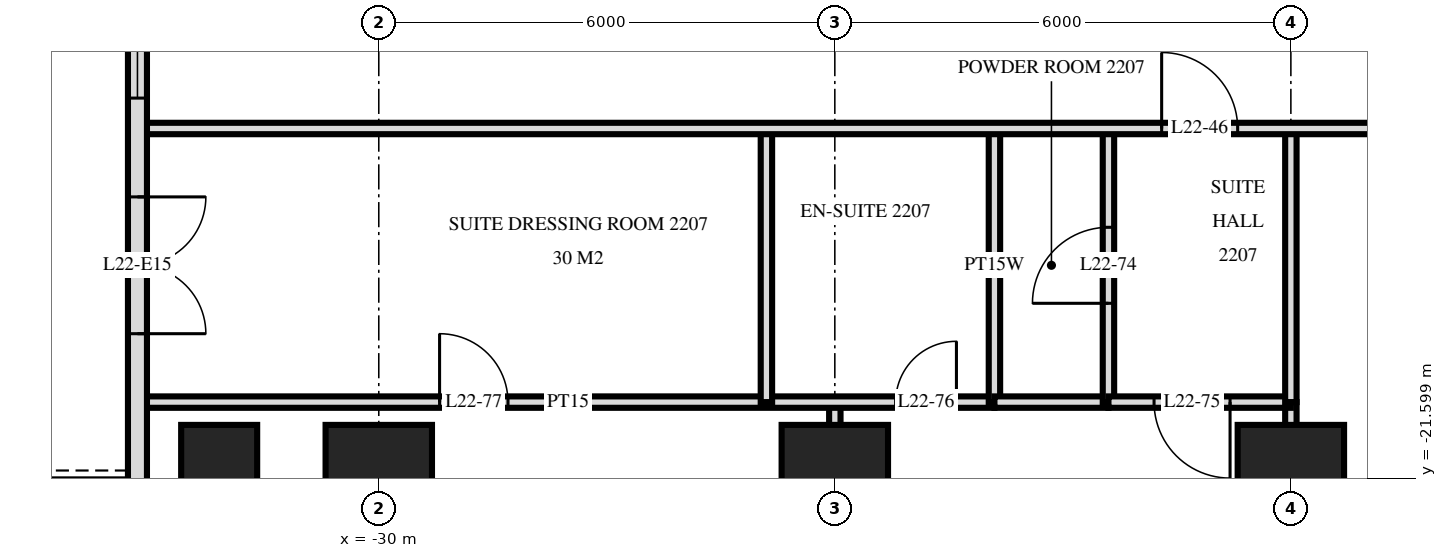
"""IFC4 building model, lengths in metres.
Left out: names, types, materials, properties, quantities, classifications, styles, units other than length and angle.
Written with IfcOpenShell. Run it as: python <this file> out.ifc"""

import sys

from ifc_helpers import new_model, si_unit, direction, frame, frame_2d, origin, origin_2d, place, context, subcontext, project, spatial, rectangle, extrude, element, fill, save


model = new_model("IFC4")
c1 = context("Model", 3, precision=1e-05, world=origin(), true_north=direction((0.0, 1.0)))
c2 = subcontext(c1, "Body", "Model", "MODEL_VIEW")
j1 = project(units=[si_unit("LENGTHUNIT", "METRE"), si_unit("PLANEANGLEUNIT", "RADIAN")], contexts=[c1])
p1 = place(None, origin())
s1 = spatial("IfcSite", under=j1, at=p1, CompositionType="ELEMENT")
p2 = place(p1, origin())
s2 = spatial("IfcBuilding", under=s1, at=p2, CompositionType="ELEMENT")
p3 = place(p2, frame((0.0, 0.0, 88.8)))
s3 = spatial("IfcBuildingStorey", under=s2, at=p3, CompositionType="ELEMENT", Elevation=88.8)
p4 = place(p3, frame((-32.1, -21.6, 0.0), z_axis=(0.0, 0.0, 1.0), x_axis=(0.0, 1.0, 0.0)))
e1 = element("IfcColumn", 1, at=p4, inside=s3, PredefinedType="COLUMN", context=c2, shape_type="SweptSolid", body=[
    extrude(rectangle(XDim=1.4, YDim=1.0, at=origin_2d()), origin(), (0.0, 0.0, 1.0), 3.6),
])
for number, where, z_axis, x_axis in (
    (2, (-30.0, -21.6, 0.0), (0.0, 0.0, 1.0), (1.0, 0.0, 0.0)),
    (3, (-24.0, -21.6, 0.0), (0.0, 0.0, 1.0), (1.0, 0.0, 0.0)),
    (4, (-18.0, -21.6, 0.0), (0.0, 0.0, 1.0), (1.0, 0.0, 0.0)),
):
    element("IfcColumn", number, at=place(p3, frame(where, z_axis=z_axis, x_axis=x_axis)), inside=s3, PredefinedType="COLUMN", context=c2, shape_type="SweptSolid", body=[
        extrude(rectangle(XDim=1.4, YDim=1.4, at=origin_2d()), origin(), (0.0, 0.0, 1.0), 3.6),
    ])
p5 = place(p3, frame((-33.175, -3.325, 0.0), z_axis=(0.0, 0.0, 1.0), x_axis=(0.0, -1.0, 0.0)))
e5 = element("IfcWall", 5, at=p5, inside=s3, PredefinedType="SOLIDWALL", context=c2, shape_type="SweptSolid", body=[
    extrude(rectangle(XDim=21.551, YDim=0.25, at=frame_2d((10.775, 0.0))), origin(), (0.0, 0.0, 1.0), 3.32),
])
p6 = place(p5, frame((7.025, 0.0, 0.0)))
e6 = element("IfcOpeningElement", 6, at=p6, cuts=e5, PredefinedType="OPENING", context=c2, shape_type="SweptSolid", body=[
    extrude(rectangle(XDim=1.8, YDim=2.4, at=frame_2d((0.9, 1.2))), frame((0.0, 0.135, 0.0), z_axis=(0.0, -1.0, 0.0), x_axis=(1.0, 0.0, 0.0)), (0.0, 0.0, 1.0), 0.27),
])
p7 = place(p5, frame((12.075, 0.0, 0.3)))
e7 = element("IfcOpeningElement", 7, at=p7, cuts=e5, PredefinedType="OPENING", context=c2, shape_type="SweptSolid", body=[
    extrude(rectangle(XDim=1.2, YDim=2.1, at=frame_2d((0.6, 1.05))), frame((0.0, 0.135, 0.0), z_axis=(0.0, -1.0, 0.0), x_axis=(1.0, 0.0, 0.0)), (0.0, 0.0, 1.0), 0.27),
])
p8 = place(p5, frame((14.575, 0.0, 0.0)))
e8 = element("IfcOpeningElement", 8, at=p8, cuts=e5, PredefinedType="OPENING", context=c2, shape_type="SweptSolid", body=[
    extrude(rectangle(XDim=1.8, YDim=2.4, at=frame_2d((0.9, 1.2))), frame((0.0, 0.135, 0.0), z_axis=(0.0, -1.0, 0.0), x_axis=(1.0, 0.0, 0.0)), (0.0, 0.0, 1.0), 0.27),
])
p9 = place(p5, frame((18.875, 0.0, 0.0)))
e9 = element("IfcOpeningElement", 9, at=p9, cuts=e5, PredefinedType="OPENING", context=c2, shape_type="SweptSolid", body=[
    extrude(rectangle(XDim=1.8, YDim=2.4, at=frame_2d((0.9, 1.2))), frame((0.0, 0.135, 0.0), z_axis=(0.0, -1.0, 0.0), x_axis=(1.0, 0.0, 0.0)), (0.0, 0.0, 1.0), 0.27),
])
p10 = place(p3, frame((-18.0, -20.6, 0.0), z_axis=(0.0, 0.0, 1.0), x_axis=(0.0, 1.0, 0.0)))
e10 = element("IfcWall", 10, at=p10, inside=s3, PredefinedType="PARTITIONING", context=c2, shape_type="SweptSolid", body=[
    extrude(rectangle(XDim=3.6, YDim=0.15, at=frame_2d((1.8, 0.0))), origin(), (0.0, 0.0, 1.0), 3.32),
])
p11 = place(p3, frame((-18.0, -29.22, 0.0), z_axis=(0.0, 0.0, 1.0), x_axis=(0.0, 1.0, 0.0)))
e11 = element("IfcWall", 11, at=p11, inside=s3, PredefinedType="PARTITIONING", context=c2, shape_type="SweptSolid", body=[
    extrude(rectangle(XDim=8.62, YDim=0.15, at=frame_2d((4.31, 0.0))), origin(), (0.0, 0.0, 1.0), 3.32),
])
p12 = place(p3, frame((-20.4, -20.6, 0.0), z_axis=(0.0, 0.0, 1.0), x_axis=(0.0, 1.0, 0.0)))
e12 = element("IfcWall", 12, at=p12, inside=s3, PredefinedType="PARTITIONING", context=c2, shape_type="SweptSolid", body=[
    extrude(rectangle(XDim=3.6, YDim=0.15, at=frame_2d((1.8, 0.0))), origin(), (0.0, 0.0, 1.0), 3.32),
])
p13 = place(p12, frame((1.3, 0.0, 0.0)))
e13 = element("IfcOpeningElement", 13, at=p13, cuts=e12, PredefinedType="OPENING", context=c2, shape_type="SweptSolid", body=[
    extrude(rectangle(XDim=1.0, YDim=2.1, at=frame_2d((0.5, 1.05))), frame((0.0, 0.085, 0.0), z_axis=(0.0, -1.0, 0.0), x_axis=(1.0, 0.0, 0.0)), (0.0, 0.0, 1.0), 0.17),
])
p14 = place(p3, frame((-21.9, -20.6, 0.0), z_axis=(0.0, 0.0, 1.0), x_axis=(0.0, 1.0, 0.0)))
e14 = element("IfcWall", 14, at=p14, inside=s3, PredefinedType="PLUMBINGWALL", context=c2, shape_type="SweptSolid", body=[
    extrude(rectangle(XDim=3.6, YDim=0.15, at=frame_2d((1.8, 0.0))), origin(), (0.0, 0.0, 1.0), 3.32),
])
p15 = place(p3, frame((-24.0, -29.22, 0.0), z_axis=(0.0, 0.0, 1.0), x_axis=(0.0, 1.0, 0.0)))
e15 = element("IfcWall", 15, at=p15, inside=s3, PredefinedType="PARTITIONING", context=c2, shape_type="SweptSolid", body=[
    extrude(rectangle(XDim=8.62, YDim=0.15, at=frame_2d((4.31, 0.0))), origin(), (0.0, 0.0, 1.0), 3.32),
])
p16 = place(p15, frame((3.79, 0.0, 0.0)))
e16 = element("IfcOpeningElement", 16, at=p16, cuts=e15, PredefinedType="OPENING", context=c2, shape_type="SweptSolid", body=[
    extrude(rectangle(XDim=0.9, YDim=2.1, at=frame_2d((0.45, 1.05))), frame((0.0, 0.085, 0.0), z_axis=(0.0, -1.0, 0.0), x_axis=(1.0, 0.0, 0.0)), (0.0, 0.0, 1.0), 0.17),
])
p17 = place(p3, frame((-24.9, -20.6, 0.0), z_axis=(0.0, 0.0, 1.0), x_axis=(0.0, 1.0, 0.0)))
e17 = element("IfcWall", 17, at=p17, inside=s3, PredefinedType="PARTITIONING", context=c2, shape_type="SweptSolid", body=[
    extrude(rectangle(XDim=3.6, YDim=0.15, at=frame_2d((1.8, 0.0))), origin(), (0.0, 0.0, 1.0), 3.32),
])
p18 = place(p3, frame((-20.4, -20.6, 0.0), z_axis=(0.0, 0.0, 1.0), x_axis=(1.0, 0.0, 0.0)))
e18 = element("IfcWall", 18, at=p18, inside=s3, PredefinedType="PARTITIONING", context=c2, shape_type="SweptSolid", body=[
    extrude(rectangle(XDim=2.4, YDim=0.15, at=frame_2d((1.2, 0.0))), origin(), (0.0, 0.0, 1.0), 3.32),
])
p19 = place(p18, frame((0.6, 0.0, 0.0)))
e19 = element("IfcOpeningElement", 19, at=p19, cuts=e18, PredefinedType="OPENING", context=c2, shape_type="SweptSolid", body=[
    extrude(rectangle(XDim=1.0, YDim=2.1, at=frame_2d((0.5, 1.05))), frame((0.0, 0.085, 0.0), z_axis=(0.0, -1.0, 0.0), x_axis=(1.0, 0.0, 0.0)), (0.0, 0.0, 1.0), 0.17),
])
p20 = place(p3, frame((-33.12, -20.6, 0.0), z_axis=(0.0, 0.0, 1.0), x_axis=(1.0, 0.0, 0.0)))
e20 = element("IfcWall", 20, at=p20, inside=s3, PredefinedType="PARTITIONING", context=c2, shape_type="SweptSolid", body=[
    extrude(rectangle(XDim=11.22, YDim=0.15, at=frame_2d((5.61, 0.0))), origin(), (0.0, 0.0, 1.0), 3.32),
])
p21 = place(p20, frame((9.92, 0.0, 0.0)))
e21 = element("IfcOpeningElement", 21, at=p21, cuts=e20, PredefinedType="OPENING", context=c2, shape_type="SweptSolid", body=[
    extrude(rectangle(XDim=0.8, YDim=2.1, at=frame_2d((0.4, 1.05))), frame((0.0, 0.085, 0.0), z_axis=(0.0, -1.0, 0.0), x_axis=(1.0, 0.0, 0.0)), (0.0, 0.0, 1.0), 0.17),
])
p22 = place(p20, frame((3.92, 0.0, 0.0)))
e22 = element("IfcOpeningElement", 22, at=p22, cuts=e20, PredefinedType="OPENING", context=c2, shape_type="SweptSolid", body=[
    extrude(rectangle(XDim=0.9, YDim=2.1, at=frame_2d((0.45, 1.05))), frame((0.0, 0.085, 0.0), z_axis=(0.0, -1.0, 0.0), x_axis=(1.0, 0.0, 0.0)), (0.0, 0.0, 1.0), 0.17),
])
p23 = place(p3, frame((-21.9, -20.6, 0.0), z_axis=(0.0, 0.0, 1.0), x_axis=(1.0, 0.0, 0.0)))
e23 = element("IfcWall", 23, at=p23, inside=s3, PredefinedType="PLUMBINGWALL", context=c2, shape_type="SweptSolid", body=[
    extrude(rectangle(XDim=1.5, YDim=0.15, at=frame_2d((0.75, 0.0))), origin(), (0.0, 0.0, 1.0), 3.32),
])
p24 = place(p3, frame((-33.12, -17.0, 0.0), z_axis=(0.0, 0.0, 1.0), x_axis=(1.0, 0.0, 0.0)))
e24 = element("IfcWall", 24, at=p24, inside=s3, PredefinedType="PARTITIONING", context=c2, shape_type="SweptSolid", body=[
    extrude(rectangle(XDim=66.24, YDim=0.15, at=frame_2d((33.12, 0.0))), origin(), (0.0, 0.0, 1.0), 3.32),
])
p25 = place(p24, frame((16.27, 0.0, 0.0)))
e25 = element("IfcOpeningElement", 25, at=p25, cuts=e24, PredefinedType="OPENING", context=c2, shape_type="SweptSolid", body=[
    extrude(rectangle(XDim=1.0, YDim=2.1, at=frame_2d((0.5, 1.05))), frame((0.0, 0.085, 0.0), z_axis=(0.0, -1.0, 0.0), x_axis=(1.0, 0.0, 0.0)), (0.0, 0.0, 1.0), 0.17),
])
p26 = place(p24, frame((22.97, 0.0, 0.0)))
e26 = element("IfcOpeningElement", 26, at=p26, cuts=e24, PredefinedType="OPENING", context=c2, shape_type="SweptSolid", body=[
    extrude(rectangle(XDim=1.0, YDim=2.1, at=frame_2d((0.5, 1.05))), frame((0.0, 0.085, 0.0), z_axis=(0.0, -1.0, 0.0), x_axis=(1.0, 0.0, 0.0)), (0.0, 0.0, 1.0), 0.17),
])
p27 = place(p24, frame((34.42, 0.0, 0.0)))
e27 = element("IfcOpeningElement", 27, at=p27, cuts=e24, PredefinedType="OPENING", context=c2, shape_type="SweptSolid", body=[
    extrude(rectangle(XDim=1.0, YDim=2.1, at=frame_2d((0.5, 1.05))), frame((0.0, 0.085, 0.0), z_axis=(0.0, -1.0, 0.0), x_axis=(1.0, 0.0, 0.0)), (0.0, 0.0, 1.0), 0.17),
])
p28 = place(p24, frame((39.22, 0.0, 0.0)))
e28 = element("IfcOpeningElement", 28, at=p28, cuts=e24, PredefinedType="OPENING", context=c2, shape_type="SweptSolid", body=[
    extrude(rectangle(XDim=1.0, YDim=2.1, at=frame_2d((0.5, 1.05))), frame((0.0, 0.085, 0.0), z_axis=(0.0, -1.0, 0.0), x_axis=(1.0, 0.0, 0.0)), (0.0, 0.0, 1.0), 0.17),
])
p29 = place(p24, frame((42.27, 0.0, 0.0)))
e29 = element("IfcOpeningElement", 29, at=p29, cuts=e24, PredefinedType="OPENING", context=c2, shape_type="SweptSolid", body=[
    extrude(rectangle(XDim=1.0, YDim=2.1, at=frame_2d((0.5, 1.05))), frame((0.0, 0.085, 0.0), z_axis=(0.0, -1.0, 0.0), x_axis=(1.0, 0.0, 0.0)), (0.0, 0.0, 1.0), 0.17),
])
p30 = place(p24, frame((45.82, 0.0, 0.0)))
e30 = element("IfcOpeningElement", 30, at=p30, cuts=e24, PredefinedType="OPENING", context=c2, shape_type="SweptSolid", body=[
    extrude(rectangle(XDim=1.0, YDim=2.1, at=frame_2d((0.5, 1.05))), frame((0.0, 0.085, 0.0), z_axis=(0.0, -1.0, 0.0), x_axis=(1.0, 0.0, 0.0)), (0.0, 0.0, 1.0), 0.17),
])
p31 = place(p24, frame((13.42, 0.0, 0.0)))
e31 = element("IfcOpeningElement", 31, at=p31, cuts=e24, PredefinedType="OPENING", context=c2, shape_type="SweptSolid", body=[
    extrude(rectangle(XDim=1.0, YDim=2.1, at=frame_2d((0.5, 1.05))), frame((0.0, 0.085, 0.0), z_axis=(0.0, -1.0, 0.0), x_axis=(1.0, 0.0, 0.0)), (0.0, 0.0, 1.0), 0.17),
])
p32 = place(p24, frame((54.82, 0.0, 0.0)))
e32 = element("IfcOpeningElement", 32, at=p32, cuts=e24, PredefinedType="OPENING", context=c2, shape_type="SweptSolid", body=[
    extrude(rectangle(XDim=1.0, YDim=2.1, at=frame_2d((0.5, 1.05))), frame((0.0, 0.085, 0.0), z_axis=(0.0, -1.0, 0.0), x_axis=(1.0, 0.0, 0.0)), (0.0, 0.0, 1.0), 0.17),
])
p33 = place(p7, origin())
e33 = element("IfcWindow", 33, at=p33, inside=s3, PartitioningType="SINGLE_PANEL", PredefinedType="WINDOW", context=c2, shape_type="SweptSolid", body=[
    extrude(rectangle(XDim=1.2, YDim=2.1, at=frame_2d((0.6, 1.05))), frame((0.0, 0.03, 0.0), z_axis=(0.0, -1.0, 0.0), x_axis=(1.0, 0.0, 0.0)), (0.0, 0.0, 1.0), 0.06),
])
fill(e7, e33)
p34 = place(p8, origin())
e34 = element("IfcDoor", 34, at=p34, inside=s3, OperationType="DOUBLE_DOOR_SINGLE_SWING", PredefinedType="DOOR", context=c2, shape_type="SweptSolid", body=[
    extrude(rectangle(XDim=1.8, YDim=2.4, at=frame_2d((0.9, 1.2))), frame((0.0, 0.025, 0.0), z_axis=(0.0, -1.0, 0.0), x_axis=(1.0, 0.0, 0.0)), (0.0, 0.0, 1.0), 0.05),
])
fill(e8, e34)
p35 = place(p31, origin())
e35 = element("IfcDoor", 35, at=p35, inside=s3, OperationType="SINGLE_SWING_RIGHT", PredefinedType="DOOR", context=c2, shape_type="SweptSolid", body=[
    extrude(rectangle(XDim=1.0, YDim=2.1, at=frame_2d((0.5, 1.05))), frame((0.0, 0.025, 0.0), z_axis=(0.0, -1.0, 0.0), x_axis=(1.0, 0.0, 0.0)), (0.0, 0.0, 1.0), 0.05),
])
fill(e31, e35)
p36 = place(p13, origin())
e36 = element("IfcDoor", 36, at=p36, inside=s3, OperationType="SINGLE_SWING_RIGHT", PredefinedType="DOOR", context=c2, shape_type="SweptSolid", body=[
    extrude(rectangle(XDim=1.0, YDim=2.1, at=frame_2d((0.5, 1.05))), frame((0.0, 0.025, 0.0), z_axis=(0.0, -1.0, 0.0), x_axis=(1.0, 0.0, 0.0)), (0.0, 0.0, 1.0), 0.05),
])
fill(e13, e36)
p37 = place(p19, frame((0.5, 0.0, 0.0), z_axis=(0.0, 0.0, 1.0), x_axis=(-1.0, 0.0, 0.0)))
e37 = element("IfcDoor", 37, at=p37, inside=s3, OperationType="SINGLE_SWING_RIGHT", PredefinedType="DOOR", context=c2, shape_type="SweptSolid", body=[
    extrude(rectangle(XDim=1.0, YDim=2.1, at=frame_2d((0.0, 1.05))), frame((0.0, -0.025, 0.0), z_axis=(0.0, 1.0, 0.0), x_axis=(-1.0, 0.0, 0.0)), (0.0, 0.0, 1.0), 0.05),
])
fill(e19, e37)
p38 = place(p21, origin())
e38 = element("IfcDoor", 38, at=p38, inside=s3, OperationType="SINGLE_SWING_LEFT", PredefinedType="DOOR", context=c2, shape_type="SweptSolid", body=[
    extrude(rectangle(XDim=0.8, YDim=2.1, at=frame_2d((0.4, 1.05))), frame((0.0, 0.025, 0.0), z_axis=(0.0, -1.0, 0.0), x_axis=(1.0, 0.0, 0.0)), (0.0, 0.0, 1.0), 0.05),
])
fill(e21, e38)
p39 = place(p22, origin())
e39 = element("IfcDoor", 39, at=p39, inside=s3, OperationType="SINGLE_SWING_RIGHT", PredefinedType="DOOR", context=c2, shape_type="SweptSolid", body=[
    extrude(rectangle(XDim=0.9, YDim=2.1, at=frame_2d((0.45, 1.05))), frame((0.0, 0.025, 0.0), z_axis=(0.0, -1.0, 0.0), x_axis=(1.0, 0.0, 0.0)), (0.0, 0.0, 1.0), 0.05),
])
fill(e22, e39)
save(model, sys.argv[1])
